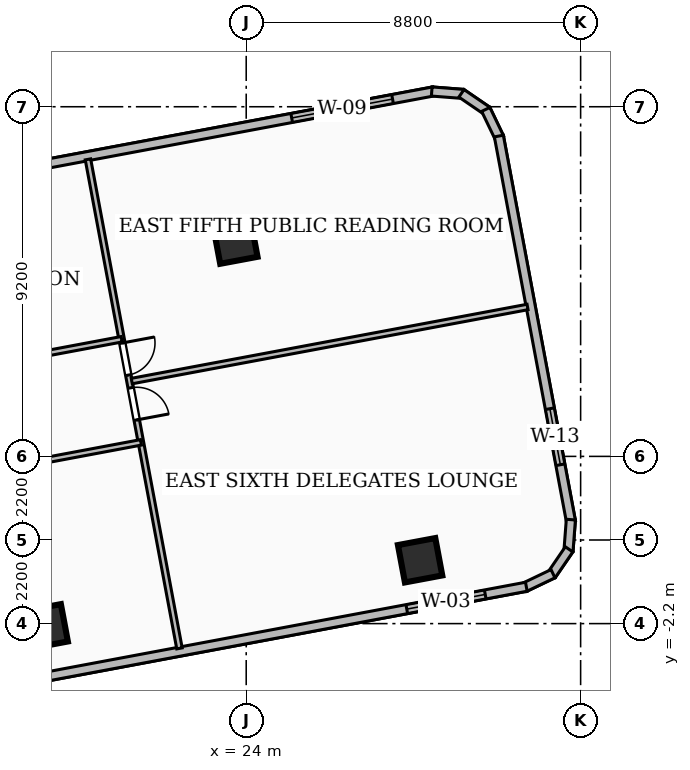
"""IFC4 building model, lengths in metres.
Left out: names, types, materials, properties, quantities, classifications, styles, units other than length and angle.
Written with IfcOpenShell. Run it as: python <this file> out.ifc"""

import sys

from ifc_helpers import new_model, si_unit, direction, frame, frame_2d, origin, origin_2d, place, context, subcontext, project, spatial, rectangle, extrude, element, fill, save


model = new_model("IFC4")
c1 = context("Model", 3, precision=1e-05, world=origin(), true_north=direction((0.0, 1.0)))
c2 = subcontext(c1, "Body", "Model", "MODEL_VIEW")
j1 = project(units=[si_unit("LENGTHUNIT", "METRE"), si_unit("PLANEANGLEUNIT", "RADIAN")], contexts=[c1])
p1 = place(None, origin())
s1 = spatial("IfcSite", under=j1, at=p1, CompositionType="ELEMENT")
p2 = place(p1, origin())
s2 = spatial("IfcBuilding", under=s1, at=p2, CompositionType="ELEMENT")
p3 = place(p2, frame((0.0, 0.0, 103.68)))
s3 = spatial("IfcBuildingStorey", under=s2, at=p3, CompositionType="ELEMENT", Elevation=103.68)
for number, where, z_axis, x_axis in (
    (1, (18.724, -2.271, 0.0), (0.0, 0.0, 1.0), (0.983, 0.184, 0.0)),
    (2, (28.576, -0.533, 0.0), (0.0, 0.0, 1.0), (0.983, 0.184, 0.0)),
    (3, (23.715, 7.851, 0.0), (0.0, 0.0, 1.0), (0.983, 0.184, 0.0)),
):
    element("IfcColumn", number, at=place(p3, frame(where, z_axis=z_axis, x_axis=x_axis)), inside=s3, PredefinedType="COLUMN", context=c2, shape_type="SweptSolid", body=[
        extrude(rectangle(XDim=1.0, YDim=1.0, at=origin_2d()), origin(), (0.0, 0.0, 1.0), 3.6),
    ])
p4 = place(p3, frame((12.935, 8.809, 0.0), z_axis=(0.0, 0.0, 1.0), x_axis=(0.982922588066, 0.184019525782, 0.0)))
e4 = element("IfcWall", 4, at=p4, inside=s3, PredefinedType="SOLIDWALL", context=c2, shape_type="SweptSolid", body=[
    extrude(rectangle(XDim=16.275, YDim=0.24, at=frame_2d((8.137, 0.0))), origin(), (0.0, 0.0, 1.0), 3.2),
])
p5 = place(p4, frame((12.475, 0.0, 0.85)))
e5 = element("IfcOpeningElement", 5, at=p5, cuts=e4, PredefinedType="OPENING", context=c2, shape_type="SweptSolid", body=[
    extrude(rectangle(XDim=2.7, YDim=1.65, at=frame_2d((1.35, 0.825))), frame((0.0, 0.13, 0.0), z_axis=(0.0, -1.0, 0.0), x_axis=(1.0, 0.0, 0.0)), (0.0, 0.0, 1.0), 0.26),
])
p6 = place(p3, frame((28.882, 11.801, 0.0), z_axis=(0.0, 0.0, 1.0), x_axis=(0.997028485347, -0.077033754987, 0.0)))
e6 = element("IfcWall", 6, at=p6, inside=s3, PredefinedType="SOLIDWALL", context=c2, shape_type="SweptSolid", body=[
    extrude(rectangle(XDim=0.83, YDim=0.24, at=frame_2d((0.415, 0.0))), origin(), (0.0, 0.0, 1.0), 3.2),
])
p7 = place(p3, frame((29.664, 11.753, 0.0), z_axis=(0.0, 0.0, 1.0), x_axis=(0.825160141847, -0.564898876177, 0.0)))
e7 = element("IfcWall", 7, at=p7, inside=s3, PredefinedType="SOLIDWALL", context=c2, shape_type="SweptSolid", body=[
    extrude(rectangle(XDim=0.814, YDim=0.24, at=frame_2d((0.407, 0.0))), origin(), (0.0, 0.0, 1.0), 3.2),
])
p8 = place(p3, frame((30.304, 11.33, 0.0), z_axis=(0.0, 0.0, 1.0), x_axis=(0.433294434868, -0.901252424525, 0.0)))
e8 = element("IfcWall", 8, at=p8, inside=s3, PredefinedType="SOLIDWALL", context=c2, shape_type="SweptSolid", body=[
    extrude(rectangle(XDim=0.831, YDim=0.24, at=frame_2d((0.416, 0.0))), origin(), (0.0, 0.0, 1.0), 3.2),
])
p9 = place(p3, frame((30.648, 10.629, 0.0), z_axis=(0.0, 0.0, 1.0), x_axis=(0.183929967783, -0.982939350597, 0.0)))
e9 = element("IfcWall", 9, at=p9, inside=s3, PredefinedType="SOLIDWALL", context=c2, shape_type="SweptSolid", body=[
    extrude(rectangle(XDim=10.319, YDim=0.24, at=frame_2d((5.159, 0.0))), origin(), (0.0, 0.0, 1.0), 3.2),
])
p10 = place(p9, frame((7.299, 0.0, 0.85)))
e10 = element("IfcOpeningElement", 10, at=p10, cuts=e9, PredefinedType="OPENING", context=c2, shape_type="SweptSolid", body=[
    extrude(rectangle(XDim=1.5, YDim=1.8, at=frame_2d((0.75, 0.9))), frame((0.0, 0.13, 0.0), z_axis=(0.0, -1.0, 0.0), x_axis=(1.0, 0.0, 0.0)), (0.0, 0.0, 1.0), 0.26),
])
p11 = place(p3, frame((32.543, 0.536, 0.0), z_axis=(0.0, 0.0, 1.0), x_axis=(-0.07586448817, -0.997118137151, 0.0)))
e11 = element("IfcWall", 11, at=p11, inside=s3, PredefinedType="SOLIDWALL", context=c2, shape_type="SweptSolid", body=[
    extrude(rectangle(XDim=0.83, YDim=0.24, at=frame_2d((0.415, 0.0))), origin(), (0.0, 0.0, 1.0), 3.2),
])
p12 = place(p3, frame((32.496, -0.246, 0.0), z_axis=(0.0, 0.0, 1.0), x_axis=(-0.56454433247, -0.825402748163, 0.0)))
e12 = element("IfcWall", 12, at=p12, inside=s3, PredefinedType="SOLIDWALL", context=c2, shape_type="SweptSolid", body=[
    extrude(rectangle(XDim=0.815, YDim=0.24, at=frame_2d((0.408, 0.0))), origin(), (0.0, 0.0, 1.0), 3.2),
])
p13 = place(p3, frame((32.073, -0.887, 0.0), z_axis=(0.0, 0.0, 1.0), x_axis=(-0.901930409836, -0.431881390908, 0.0)))
e13 = element("IfcWall", 13, at=p13, inside=s3, PredefinedType="SOLIDWALL", context=c2, shape_type="SweptSolid", body=[
    extrude(rectangle(XDim=0.832, YDim=0.24, at=frame_2d((0.416, 0.0))), origin(), (0.0, 0.0, 1.0), 3.2),
])
p14 = place(p3, frame((31.371, -1.23, 0.0), z_axis=(0.0, 0.0, 1.0), x_axis=(-0.982920382654, -0.18403130539, 0.0)))
e14 = element("IfcWall", 14, at=p14, inside=s3, PredefinedType="SOLIDWALL", context=c2, shape_type="SweptSolid", body=[
    extrude(rectangle(XDim=16.275, YDim=0.24, at=frame_2d((8.138, 0.0))), origin(), (0.0, 0.0, 1.0), 3.2),
])
p15 = place(p14, frame((1.1, 0.0, 0.85)))
e15 = element("IfcOpeningElement", 15, at=p15, cuts=e14, PredefinedType="OPENING", context=c2, shape_type="SweptSolid", body=[
    extrude(rectangle(XDim=2.1, YDim=2.0, at=frame_2d((1.05, 1.0))), frame((0.0, 0.13, 0.0), z_axis=(0.0, -1.0, 0.0), x_axis=(1.0, 0.0, 0.0)), (0.0, 0.0, 1.0), 0.26),
])
p16 = place(p3, frame((20.722, 5.282, 0.0), z_axis=(0.0, 0.0, 1.0), x_axis=(-0.982936027627, -0.183947725163, 0.0)))
e16 = element("IfcWall", 16, at=p16, inside=s3, PredefinedType="PARTITIONING", context=c2, shape_type="SweptSolid", body=[
    extrude(rectangle(XDim=7.05, YDim=0.145, at=frame_2d((3.525, 0.0))), origin(), (0.0, 0.0, 1.0), 3.2),
])
p17 = place(p16, frame((3.075, 0.0, 0.0)))
e17 = element("IfcOpeningElement", 17, at=p17, cuts=e16, PredefinedType="OPENING", context=c2, shape_type="SweptSolid", body=[
    extrude(rectangle(XDim=0.95, YDim=2.08, at=frame_2d((0.475, 1.04))), frame((0.0, 0.083, 0.0), z_axis=(0.0, -1.0, 0.0), x_axis=(1.0, 0.0, 0.0)), (0.0, 0.0, 1.0), 0.165),
])
p18 = place(p3, frame((14.3, 1.272, 0.0), z_axis=(0.0, 0.0, 1.0), x_axis=(0.98292976592, 0.183981181833, 0.0)))
e18 = element("IfcWall", 18, at=p18, inside=s3, PredefinedType="PARTITIONING", context=c2, shape_type="SweptSolid", body=[
    extrude(rectangle(XDim=7.05, YDim=0.145, at=frame_2d((3.525, 0.0))), origin(), (0.0, 0.0, 1.0), 3.2),
])
p19 = place(p18, frame((3.075, 0.0, 0.0)))
e19 = element("IfcOpeningElement", 19, at=p19, cuts=e18, PredefinedType="OPENING", context=c2, shape_type="SweptSolid", body=[
    extrude(rectangle(XDim=0.95, YDim=2.08, at=frame_2d((0.475, 1.04))), frame((0.0, 0.083, 0.0), z_axis=(0.0, -1.0, 0.0), x_axis=(1.0, 0.0, 0.0)), (0.0, 0.0, 1.0), 0.165),
])
p20 = place(p3, frame((20.989, 4.182, 0.0), z_axis=(0.0, 0.0, 1.0), x_axis=(0.982930571593, 0.183976877429, 0.0)))
e20 = element("IfcWall", 20, at=p20, inside=s3, PredefinedType="PARTITIONING", context=c2, shape_type="SweptSolid", body=[
    extrude(rectangle(XDim=10.595, YDim=0.145, at=frame_2d((5.297, 0.0))), origin(), (0.0, 0.0, 1.0), 2.692),
])
p21 = place(p3, frame((19.836, 10.015, 0.0), z_axis=(0.0, 0.0, 1.0), x_axis=(0.183949578206, -0.982935680845, 0.0)))
e21 = element("IfcWall", 21, at=p21, inside=s3, PredefinedType="PARTITIONING", context=c2, shape_type="SweptSolid", body=[
    extrude(rectangle(XDim=13.09, YDim=0.145, at=frame_2d((6.545, 0.0))), origin(), (0.0, 0.0, 1.0), 2.346),
])
p22 = place(p21, frame((6.115, 0.0, 0.0)))
e22 = element("IfcOpeningElement", 22, at=p22, cuts=e21, PredefinedType="OPENING", context=c2, shape_type="SweptSolid", body=[
    extrude(rectangle(XDim=0.86, YDim=2.04, at=frame_2d((0.43, 1.02))), frame((0.0, 0.083, 0.0), z_axis=(0.0, -1.0, 0.0), x_axis=(1.0, 0.0, 0.0)), (0.0, 0.0, 1.0), 0.165),
])
p23 = place(p21, frame((4.915, 0.0, 0.0)))
e23 = element("IfcOpeningElement", 23, at=p23, cuts=e21, PredefinedType="OPENING", context=c2, shape_type="SweptSolid", body=[
    extrude(rectangle(XDim=0.86, YDim=2.04, at=frame_2d((0.43, 1.02))), frame((0.0, 0.083, 0.0), z_axis=(0.0, -1.0, 0.0), x_axis=(1.0, 0.0, 0.0)), (0.0, 0.0, 1.0), 0.165),
])
p24 = place(p5, origin())
e24 = element("IfcWindow", 24, at=p24, inside=s3, PartitioningType="SINGLE_PANEL", PredefinedType="WINDOW", context=c2, shape_type="SweptSolid", body=[
    extrude(rectangle(XDim=2.7, YDim=1.65, at=frame_2d((1.35, 0.825))), frame((0.0, 0.03, 0.0), z_axis=(0.0, -1.0, 0.0), x_axis=(1.0, 0.0, 0.0)), (0.0, 0.0, 1.0), 0.06),
])
fill(e5, e24)
p25 = place(p10, origin())
e25 = element("IfcWindow", 25, at=p25, inside=s3, PartitioningType="SINGLE_PANEL", PredefinedType="WINDOW", context=c2, shape_type="SweptSolid", body=[
    extrude(rectangle(XDim=1.5, YDim=1.8, at=frame_2d((0.75, 0.9))), frame((0.0, 0.03, 0.0), z_axis=(0.0, -1.0, 0.0), x_axis=(1.0, 0.0, 0.0)), (0.0, 0.0, 1.0), 0.06),
])
fill(e10, e25)
p26 = place(p15, origin())
e26 = element("IfcWindow", 26, at=p26, inside=s3, PartitioningType="SINGLE_PANEL", PredefinedType="WINDOW", context=c2, shape_type="SweptSolid", body=[
    extrude(rectangle(XDim=2.1, YDim=2.0, at=frame_2d((1.05, 1.0))), frame((0.0, 0.03, 0.0), z_axis=(0.0, -1.0, 0.0), x_axis=(1.0, 0.0, 0.0)), (0.0, 0.0, 1.0), 0.06),
])
fill(e15, e26)
p27 = place(p22, origin())
e27 = element("IfcDoor", 27, at=p27, inside=s3, OperationType="SINGLE_SWING_RIGHT", PredefinedType="DOOR", context=c2, shape_type="SweptSolid", body=[
    extrude(rectangle(XDim=0.86, YDim=2.04, at=frame_2d((0.43, 1.02))), frame((0.0, 0.025, 0.0), z_axis=(0.0, -1.0, 0.0), x_axis=(1.0, 0.0, 0.0)), (0.0, 0.0, 1.0), 0.05),
])
fill(e22, e27)
p28 = place(p23, origin())
e28 = element("IfcDoor", 28, at=p28, inside=s3, OperationType="SINGLE_SWING_LEFT", PredefinedType="DOOR", context=c2, shape_type="SweptSolid", body=[
    extrude(rectangle(XDim=0.86, YDim=2.04, at=frame_2d((0.43, 1.02))), frame((0.0, 0.025, 0.0), z_axis=(0.0, -1.0, 0.0), x_axis=(1.0, 0.0, 0.0)), (0.0, 0.0, 1.0), 0.05),
])
fill(e23, e28)
save(model, sys.argv[1])
